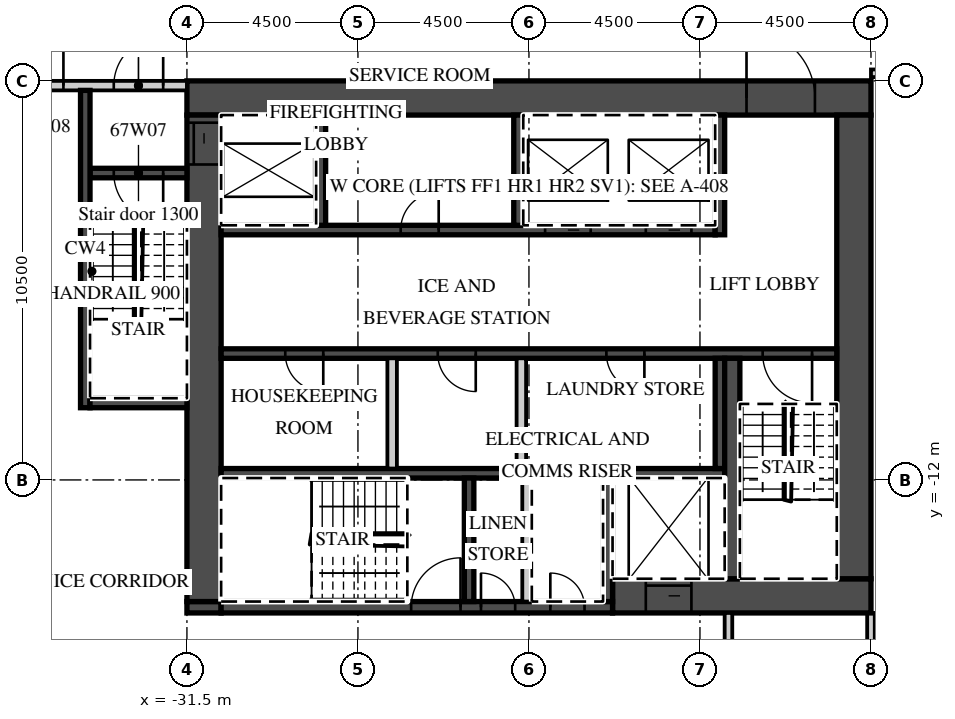
"""IFC4 building model, lengths in metres.
Left out: names, types, materials, properties, quantities, classifications, styles, units other than length and angle.
Written with IfcOpenShell. Run it as: python <this file> out.ifc"""

import sys

from ifc_helpers import new_model, si_unit, direction, frame, frame_2d, origin, place, context, subcontext, project, spatial, rectangle, extrude, element, fill, save


model = new_model("IFC4")
c1 = context("Model", 3, precision=1e-05, world=origin(), true_north=direction((0.0, 1.0)))
c2 = subcontext(c1, "Body", "Model", "MODEL_VIEW")
j1 = project(units=[si_unit("LENGTHUNIT", "METRE"), si_unit("PLANEANGLEUNIT", "RADIAN")], contexts=[c1])
p1 = place(None, origin())
s1 = spatial("IfcSite", under=j1, at=p1, CompositionType="ELEMENT")
p2 = place(p1, origin())
s2 = spatial("IfcBuilding", under=s1, at=p2, CompositionType="ELEMENT")
p3 = place(p2, frame((0.0, 0.0, 271.8)))
s3 = spatial("IfcBuildingStorey", under=s2, at=p3, CompositionType="ELEMENT", Elevation=271.8)
p4 = place(p3, frame((-13.5, -21.396, 0.0), z_axis=(0.0, 0.0, 1.0), x_axis=(0.0, 1.0, 0.0)))
e1 = element("IfcWall", 1, at=p4, inside=s3, PredefinedType="PARTITIONING", context=c2, shape_type="SweptSolid", body=[
    extrude(rectangle(XDim=5.896, YDim=0.2, at=frame_2d((2.948, 0.0))), origin(), (0.0, 0.0, 1.0), 3.02),
])
p5 = place(p3, frame((-13.5, -1.3, 0.0), z_axis=(0.0, 0.0, 1.0), x_axis=(1.0, 0.0, 0.0)))
e2 = element("IfcWall", 2, at=p5, inside=s3, PredefinedType="PARTITIONING", context=c2, shape_type="SweptSolid", body=[
    extrude(rectangle(XDim=50.293, YDim=0.2, at=frame_2d((25.146, 0.0))), origin(), (0.0, 0.0, 1.0), 3.02),
])
p6 = place(p5, frame((0.575, 0.0, 0.0)))
e3 = element("IfcOpeningElement", 3, at=p6, cuts=e2, PredefinedType="OPENING", context=c2, shape_type="SweptSolid", body=[
    extrude(rectangle(XDim=1.0, YDim=2.1, at=frame_2d((0.5, 1.05))), frame((0.0, 0.11, 0.0), z_axis=(0.0, -1.0, 0.0), x_axis=(1.0, 0.0, 0.0)), (0.0, 0.0, 1.0), 0.22),
])
p7 = place(p5, frame((6.938, 0.0, 0.0)))
e4 = element("IfcOpeningElement", 4, at=p7, cuts=e2, PredefinedType="OPENING", context=c2, shape_type="SweptSolid", body=[
    extrude(rectangle(XDim=1.2, YDim=2.1, at=frame_2d((0.6, 1.05))), frame((0.0, 0.11, 0.0), z_axis=(0.0, -1.0, 0.0), x_axis=(1.0, 0.0, 0.0)), (0.0, 0.0, 1.0), 0.22),
])
p8 = place(p5, frame((18.862, 0.0, 0.0)))
e5 = element("IfcOpeningElement", 5, at=p8, cuts=e2, PredefinedType="OPENING", context=c2, shape_type="SweptSolid", body=[
    extrude(rectangle(XDim=1.2, YDim=2.1, at=frame_2d((0.6, 1.05))), frame((0.0, 0.11, 0.0), z_axis=(0.0, -1.0, 0.0), x_axis=(1.0, 0.0, 0.0)), (0.0, 0.0, 1.0), 0.22),
])
p9 = place(p5, frame((24.938, 0.0, 0.0)))
e6 = element("IfcOpeningElement", 6, at=p9, cuts=e2, PredefinedType="OPENING", context=c2, shape_type="SweptSolid", body=[
    extrude(rectangle(XDim=1.2, YDim=2.1, at=frame_2d((0.6, 1.05))), frame((0.0, 0.11, 0.0), z_axis=(0.0, -1.0, 0.0), x_axis=(1.0, 0.0, 0.0)), (0.0, 0.0, 1.0), 0.22),
])
p10 = place(p5, frame((36.862, 0.0, 0.0)))
e7 = element("IfcOpeningElement", 7, at=p10, cuts=e2, PredefinedType="OPENING", context=c2, shape_type="SweptSolid", body=[
    extrude(rectangle(XDim=1.2, YDim=2.1, at=frame_2d((0.6, 1.05))), frame((0.0, 0.11, 0.0), z_axis=(0.0, -1.0, 0.0), x_axis=(1.0, 0.0, 0.0)), (0.0, 0.0, 1.0), 0.22),
])
p11 = place(p5, frame((43.45, 0.0, 0.0)))
e8 = element("IfcOpeningElement", 8, at=p11, cuts=e2, PredefinedType="OPENING", context=c2, shape_type="SweptSolid", body=[
    extrude(rectangle(XDim=1.0, YDim=2.1, at=frame_2d((0.5, 1.05))), frame((0.0, 0.11, 0.0), z_axis=(0.0, -1.0, 0.0), x_axis=(1.0, 0.0, 0.0)), (0.0, 0.0, 1.0), 0.22),
])
p12 = place(p5, frame((45.55, 0.0, 0.0)))
e9 = element("IfcOpeningElement", 9, at=p12, cuts=e2, PredefinedType="OPENING", context=c2, shape_type="SweptSolid", body=[
    extrude(rectangle(XDim=1.0, YDim=2.1, at=frame_2d((0.5, 1.05))), frame((0.0, 0.11, 0.0), z_axis=(0.0, -1.0, 0.0), x_axis=(1.0, 0.0, 0.0)), (0.0, 0.0, 1.0), 0.22),
])
p13 = place(p3, frame((-31.5, -1.95, 0.0), z_axis=(0.0, 0.0, 1.0), x_axis=(1.0, 0.0, 0.0)))
e10 = element("IfcWall", 10, at=p13, inside=s3, PredefinedType="SHEAR", context=c2, shape_type="SweptSolid", body=[
    extrude(rectangle(XDim=18.0, YDim=0.9, at=frame_2d((9.0, 0.0))), origin(), (0.0, 0.0, 1.0), 3.02),
])
p14 = place(p13, frame((14.725, 0.0, 0.0)))
e11 = element("IfcOpeningElement", 11, at=p14, cuts=e10, PredefinedType="OPENING", context=c2, shape_type="SweptSolid", body=[
    extrude(rectangle(XDim=1.8, YDim=2.1, at=frame_2d((0.9, 1.05))), frame((0.0, 0.46, 0.0), z_axis=(0.0, -1.0, 0.0), x_axis=(1.0, 0.0, 0.0)), (0.0, 0.0, 1.0), 0.92),
])
p15 = place(p3, frame((-20.3, -15.05, 0.0), z_axis=(0.0, 0.0, 1.0), x_axis=(1.0, 0.0, 0.0)))
e12 = element("IfcWall", 12, at=p15, inside=s3, PredefinedType="SHEAR", context=c2, shape_type="SweptSolid", body=[
    extrude(rectangle(XDim=6.8, YDim=0.9, at=frame_2d((3.4, 0.0))), origin(), (0.0, 0.0, 1.0), 3.02),
])
p16 = place(p15, frame((0.875, 0.0, 0.0)))
e13 = element("IfcOpeningElement", 13, at=p16, cuts=e12, PredefinedType="OPENING", context=c2, shape_type="SweptSolid", body=[
    extrude(rectangle(XDim=1.2, YDim=2.1, at=frame_2d((0.6, 1.05))), frame((0.0, 0.46, 0.0), z_axis=(0.0, -1.0, 0.0), x_axis=(1.0, 0.0, 0.0)), (0.0, 0.0, 1.0), 0.92),
])
p17 = place(p3, frame((-31.5, -15.35, 0.0), z_axis=(0.0, 0.0, 1.0), x_axis=(1.0, 0.0, 0.0)))
e14 = element("IfcWall", 14, at=p17, inside=s3, PredefinedType="SHEAR", context=c2, shape_type="SweptSolid", body=[
    extrude(rectangle(XDim=0.9, YDim=0.3, at=frame_2d((0.45, 0.0))), origin(), (0.0, 0.0, 1.0), 3.02),
])
p18 = place(p3, frame((-30.6, -15.35, 0.0), z_axis=(0.0, 0.0, 1.0), x_axis=(1.0, 0.0, 0.0)))
e15 = element("IfcWall", 15, at=p18, inside=s3, PredefinedType="SHEAR", context=c2, shape_type="SweptSolid", body=[
    extrude(rectangle(XDim=10.3, YDim=0.3, at=frame_2d((5.15, 0.0))), origin(), (0.0, 0.0, 1.0), 3.02),
])
p19 = place(p18, frame((5.0, 0.0, 0.0)))
e16 = element("IfcOpeningElement", 16, at=p19, cuts=e15, PredefinedType="OPENING", context=c2, shape_type="SweptSolid", body=[
    extrude(rectangle(XDim=1.3, YDim=2.1, at=frame_2d((0.65, 1.05))), frame((0.0, 0.16, 0.0), z_axis=(0.0, -1.0, 0.0), x_axis=(1.0, 0.0, 0.0)), (0.0, 0.0, 1.0), 0.32),
])
p20 = place(p18, frame((6.837, 0.0, 0.0)))
e17 = element("IfcOpeningElement", 17, at=p20, cuts=e15, PredefinedType="OPENING", context=c2, shape_type="SweptSolid", body=[
    extrude(rectangle(XDim=0.9, YDim=2.1, at=frame_2d((0.45, 1.05))), frame((0.0, 0.16, 0.0), z_axis=(0.0, -1.0, 0.0), x_axis=(1.0, 0.0, 0.0)), (0.0, 0.0, 1.0), 0.32),
])
p21 = place(p18, frame((8.663, 0.0, 0.0)))
e18 = element("IfcOpeningElement", 18, at=p21, cuts=e15, PredefinedType="OPENING", context=c2, shape_type="SweptSolid", body=[
    extrude(rectangle(XDim=0.9, YDim=2.1, at=frame_2d((0.45, 1.05))), frame((0.0, 0.16, 0.0), z_axis=(0.0, -1.0, 0.0), x_axis=(1.0, 0.0, 0.0)), (0.0, 0.0, 1.0), 0.32),
])
p22 = place(p3, frame((-31.05, -15.2, 0.0), z_axis=(0.0, 0.0, 1.0), x_axis=(0.0, 1.0, 0.0)))
e19 = element("IfcWall", 19, at=p22, inside=s3, PredefinedType="SHEAR", context=c2, shape_type="SweptSolid", body=[
    extrude(rectangle(XDim=12.8, YDim=0.9, at=frame_2d((6.4, 0.0))), origin(), (0.0, 0.0, 1.0), 3.02),
])
p23 = place(p22, frame((11.5, 0.0, 0.0)))
e20 = element("IfcOpeningElement", 20, at=p23, cuts=e19, PredefinedType="OPENING", context=c2, shape_type="SweptSolid", body=[
    extrude(rectangle(XDim=1.1, YDim=2.1, at=frame_2d((0.55, 1.05))), frame((0.0, 0.46, 0.0), z_axis=(0.0, -1.0, 0.0), x_axis=(1.0, 0.0, 0.0)), (0.0, 0.0, 1.0), 0.92),
])
p24 = place(p3, frame((-13.95, -14.6, 0.0), z_axis=(0.0, 0.0, 1.0), x_axis=(0.0, 1.0, 0.0)))
e21 = element("IfcWall", 21, at=p24, inside=s3, PredefinedType="SHEAR", context=c2, shape_type="SweptSolid", body=[
    extrude(rectangle(XDim=12.2, YDim=0.9, at=frame_2d((6.1, 0.0))), origin(), (0.0, 0.0, 1.0), 3.02),
])
p25 = place(p3, frame((-30.6, -5.425, 0.0), z_axis=(0.0, 0.0, 1.0), x_axis=(1.0, 0.0, 0.0)))
e22 = element("IfcWall", 22, at=p25, inside=s3, PredefinedType="SHEAR", context=c2, shape_type="SweptSolid", body=[
    extrude(rectangle(XDim=13.0, YDim=0.25, at=frame_2d((6.5, 0.0))), origin(), (0.0, 0.0, 1.0), 3.02),
])
p26 = place(p25, frame((8.525, 0.0, 0.0)))
e23 = element("IfcOpeningElement", 23, at=p26, cuts=e22, PredefinedType="OPENING", context=c2, shape_type="SweptSolid", body=[
    extrude(rectangle(XDim=1.2, YDim=2.1, at=frame_2d((0.6, 1.05))), frame((0.0, 0.135, 0.0), z_axis=(0.0, -1.0, 0.0), x_axis=(1.0, 0.0, 0.0)), (0.0, 0.0, 1.0), 0.27),
])
p27 = place(p25, frame((11.175, 0.0, 0.0)))
e24 = element("IfcOpeningElement", 24, at=p27, cuts=e22, PredefinedType="OPENING", context=c2, shape_type="SweptSolid", body=[
    extrude(rectangle(XDim=1.2, YDim=2.1, at=frame_2d((0.6, 1.05))), frame((0.0, 0.135, 0.0), z_axis=(0.0, -1.0, 0.0), x_axis=(1.0, 0.0, 0.0)), (0.0, 0.0, 1.0), 0.27),
])
p28 = place(p25, frame((4.725, 0.0, 0.0)))
e25 = element("IfcOpeningElement", 25, at=p28, cuts=e22, PredefinedType="OPENING", context=c2, shape_type="SweptSolid", body=[
    extrude(rectangle(XDim=1.0, YDim=2.1, at=frame_2d((0.5, 1.05))), frame((0.0, 0.135, 0.0), z_axis=(0.0, -1.0, 0.0), x_axis=(1.0, 0.0, 0.0)), (0.0, 0.0, 1.0), 0.27),
])
p29 = place(p3, frame((-17.475, -5.55, 0.0), z_axis=(0.0, 0.0, 1.0), x_axis=(0.0, 1.0, 0.0)))
e26 = element("IfcWall", 26, at=p29, inside=s3, PredefinedType="SHEAR", context=c2, shape_type="SweptSolid", body=[
    extrude(rectangle(XDim=3.15, YDim=0.25, at=frame_2d((1.575, 0.0))), origin(), (0.0, 0.0, 1.0), 3.02),
])
for number, where, z_axis, x_axis in (
    (27, (-27.975, -5.3, 0.0), (0.0, 0.0, 1.0), (0.0, 1.0, 0.0)),
    (28, (-22.775, -5.3, 0.0), (0.0, 0.0, 1.0), (0.0, 1.0, 0.0)),
):
    element("IfcWall", number, at=place(p3, frame(where, z_axis=z_axis, x_axis=x_axis)), inside=s3, PredefinedType="SHEAR", context=c2, shape_type="SweptSolid", body=[
        extrude(rectangle(XDim=2.9, YDim=0.25, at=frame_2d((1.45, 0.0))), origin(), (0.0, 0.0, 1.0), 3.02),
    ])
p30 = place(p3, frame((-30.6, -8.675, 0.0), z_axis=(0.0, 0.0, 1.0), x_axis=(1.0, 0.0, 0.0)))
e29 = element("IfcWall", 29, at=p30, inside=s3, PredefinedType="SHEAR", context=c2, shape_type="SweptSolid", body=[
    extrude(rectangle(XDim=16.2, YDim=0.25, at=frame_2d((8.1, 0.0))), origin(), (0.0, 0.0, 1.0), 3.02),
])
p31 = place(p30, frame((14.25, 0.0, 0.0)))
e30 = element("IfcOpeningElement", 30, at=p31, cuts=e29, PredefinedType="OPENING", context=c2, shape_type="SweptSolid", body=[
    extrude(rectangle(XDim=1.3, YDim=2.1, at=frame_2d((0.65, 1.05))), frame((0.0, 0.135, 0.0), z_axis=(0.0, -1.0, 0.0), x_axis=(1.0, 0.0, 0.0)), (0.0, 0.0, 1.0), 0.27),
])
p32 = place(p30, frame((1.688, 0.0, 0.0)))
e31 = element("IfcOpeningElement", 31, at=p32, cuts=e29, PredefinedType="OPENING", context=c2, shape_type="SweptSolid", body=[
    extrude(rectangle(XDim=1.0, YDim=2.1, at=frame_2d((0.5, 1.05))), frame((0.0, 0.135, 0.0), z_axis=(0.0, -1.0, 0.0), x_axis=(1.0, 0.0, 0.0)), (0.0, 0.0, 1.0), 0.27),
])
p33 = place(p30, frame((5.7, 0.0, 0.0)))
e32 = element("IfcOpeningElement", 32, at=p33, cuts=e29, PredefinedType="OPENING", context=c2, shape_type="SweptSolid", body=[
    extrude(rectangle(XDim=1.0, YDim=2.1, at=frame_2d((0.5, 1.05))), frame((0.0, 0.135, 0.0), z_axis=(0.0, -1.0, 0.0), x_axis=(1.0, 0.0, 0.0)), (0.0, 0.0, 1.0), 0.27),
])
p34 = place(p30, frame((10.137, 0.0, 0.0)))
e33 = element("IfcOpeningElement", 33, at=p34, cuts=e29, PredefinedType="OPENING", context=c2, shape_type="SweptSolid", body=[
    extrude(rectangle(XDim=1.0, YDim=2.1, at=frame_2d((0.5, 1.05))), frame((0.0, 0.135, 0.0), z_axis=(0.0, -1.0, 0.0), x_axis=(1.0, 0.0, 0.0)), (0.0, 0.0, 1.0), 0.27),
])
p35 = place(p3, frame((-30.6, -11.825, 0.0), z_axis=(0.0, 0.0, 1.0), x_axis=(1.0, 0.0, 0.0)))
e34 = element("IfcWall", 34, at=p35, inside=s3, PredefinedType="SHEAR", context=c2, shape_type="SweptSolid", body=[
    extrude(rectangle(XDim=13.25, YDim=0.25, at=frame_2d((6.625, 0.0))), origin(), (0.0, 0.0, 1.0), 3.02),
])
p36 = place(p3, frame((-17.475, -11.7, 0.0), z_axis=(0.0, 0.0, 1.0), x_axis=(0.0, 1.0, 0.0)))
e35 = element("IfcWall", 35, at=p36, inside=s3, PredefinedType="SHEAR", context=c2, shape_type="SweptSolid", body=[
    extrude(rectangle(XDim=2.9, YDim=0.25, at=frame_2d((1.45, 0.0))), origin(), (0.0, 0.0, 1.0), 3.02),
])
for number, where, z_axis, x_axis in (
    (36, (-26.1, -11.7, 0.0), (0.0, 0.0, 1.0), (0.0, 1.0, 0.0)),
    (37, (-22.7, -11.7, 0.0), (0.0, 0.0, 1.0), (0.0, 1.0, 0.0)),
):
    element("IfcWall", number, at=place(p3, frame(where, z_axis=z_axis, x_axis=x_axis)), inside=s3, PredefinedType="PARTITIONING", context=c2, shape_type="SweptSolid", body=[
        extrude(rectangle(XDim=2.9, YDim=0.25, at=frame_2d((1.45, 0.0))), origin(), (0.0, 0.0, 1.0), 3.02),
    ])
p37 = place(p3, frame((-17.15, -14.6, 0.0), z_axis=(0.0, 0.0, 1.0), x_axis=(0.0, 1.0, 0.0)))
e38 = element("IfcWall", 38, at=p37, inside=s3, PredefinedType="SHEAR", context=c2, shape_type="SweptSolid", body=[
    extrude(rectangle(XDim=5.8, YDim=0.4, at=frame_2d((2.9, 0.0))), origin(), (0.0, 0.0, 1.0), 3.02),
])
for number, where, z_axis, x_axis in (
    (39, (-20.425, -15.2, 0.0), (0.0, 0.0, 1.0), (0.0, 1.0, 0.0)),
    (40, (-24.075, -15.2, 0.0), (0.0, 0.0, 1.0), (0.0, 1.0, 0.0)),
):
    element("IfcWall", number, at=place(p3, frame(where, z_axis=z_axis, x_axis=x_axis)), inside=s3, PredefinedType="SHEAR", context=c2, shape_type="SweptSolid", body=[
        extrude(rectangle(XDim=3.25, YDim=0.25, at=frame_2d((1.625, 0.0))), origin(), (0.0, 0.0, 1.0), 3.02),
    ])
p38 = place(p3, frame((-22.55, -15.2, 0.0), z_axis=(0.0, 0.0, 1.0), x_axis=(0.0, 1.0, 0.0)))
e41 = element("IfcWall", 41, at=p38, inside=s3, PredefinedType="PARTITIONING", context=c2, shape_type="SweptSolid", body=[
    extrude(rectangle(XDim=3.25, YDim=0.25, at=frame_2d((1.625, 0.0))), origin(), (0.0, 0.0, 1.0), 3.02),
])
p39 = place(p3, frame((-39.627, -1.625, 0.0), z_axis=(0.0, 0.0, 1.0), x_axis=(1.0, 0.0, 0.0)))
e42 = element("IfcWall", 42, at=p39, inside=s3, PredefinedType="PARTITIONING", context=c2, shape_type="SweptSolid", body=[
    extrude(rectangle(XDim=8.127, YDim=0.25, at=frame_2d((4.063, 0.0))), origin(), (0.0, 0.0, 1.0), 3.02),
])
p40 = place(p39, frame((6.202, 0.0, 0.0)))
e43 = element("IfcOpeningElement", 43, at=p40, cuts=e42, PredefinedType="OPENING", context=c2, shape_type="SweptSolid", body=[
    extrude(rectangle(XDim=1.3, YDim=2.1, at=frame_2d((0.65, 1.05))), frame((0.0, 0.135, 0.0), z_axis=(0.0, -1.0, 0.0), x_axis=(1.0, 0.0, 0.0)), (0.0, 0.0, 1.0), 0.27),
])
p41 = place(p39, frame((3.777, 0.0, 0.0)))
e44 = element("IfcOpeningElement", 44, at=p41, cuts=e42, PredefinedType="OPENING", context=c2, shape_type="SweptSolid", body=[
    extrude(rectangle(XDim=1.1, YDim=2.1, at=frame_2d((0.55, 1.05))), frame((0.0, 0.135, 0.0), z_axis=(0.0, -1.0, 0.0), x_axis=(1.0, 0.0, 0.0)), (0.0, 0.0, 1.0), 0.27),
])
p42 = place(p3, frame((-34.05, -3.925, 0.0), z_axis=(0.0, 0.0, 1.0), x_axis=(1.0, 0.0, 0.0)))
e45 = element("IfcWall", 45, at=p42, inside=s3, PredefinedType="SHEAR", context=c2, shape_type="SweptSolid", body=[
    extrude(rectangle(XDim=2.55, YDim=0.25, at=frame_2d((1.275, 0.0))), origin(), (0.0, 0.0, 1.0), 3.02),
])
p43 = place(p42, frame((0.625, 0.0, 0.0)))
e46 = element("IfcOpeningElement", 46, at=p43, cuts=e45, PredefinedType="OPENING", context=c2, shape_type="SweptSolid", body=[
    extrude(rectangle(XDim=1.3, YDim=2.1, at=frame_2d((0.65, 1.05))), frame((0.0, 0.135, 0.0), z_axis=(0.0, -1.0, 0.0), x_axis=(1.0, 0.0, 0.0)), (0.0, 0.0, 1.0), 0.27),
])
p44 = place(p3, frame((-34.175, -10.1, 0.0), z_axis=(0.0, 0.0, 1.0), x_axis=(0.0, 1.0, 0.0)))
e47 = element("IfcWall", 47, at=p44, inside=s3, PredefinedType="SHEAR", context=c2, shape_type="SweptSolid", body=[
    extrude(rectangle(XDim=8.35, YDim=0.25, at=frame_2d((4.175, 0.0))), origin(), (0.0, 0.0, 1.0), 3.02),
])
p45 = place(p3, frame((-34.05, -9.975, 0.0), z_axis=(0.0, 0.0, 1.0), x_axis=(1.0, 0.0, 0.0)))
e48 = element("IfcWall", 48, at=p45, inside=s3, PredefinedType="SHEAR", context=c2, shape_type="SweptSolid", body=[
    extrude(rectangle(XDim=2.55, YDim=0.25, at=frame_2d((1.275, 0.0))), origin(), (0.0, 0.0, 1.0), 3.02),
])
p46 = place(p3, frame((-17.25, -17.7, 0.0), z_axis=(0.0, 0.0, 1.0), x_axis=(0.0, 1.0, 0.0)))
e49 = element("IfcWall", 49, at=p46, inside=s3, PredefinedType="PARTITIONING", context=c2, shape_type="SweptSolid", body=[
    extrude(rectangle(XDim=2.2, YDim=0.2, at=frame_2d((1.1, 0.0))), origin(), (0.0, 0.0, 1.0), 3.02),
])
p47 = place(p26, origin())
e50 = element("IfcDoor", 50, at=p47, inside=s3, OperationType="SLIDING_TO_LEFT", PredefinedType="DOOR", context=c2, shape_type="SweptSolid", body=[
    extrude(rectangle(XDim=1.2, YDim=2.1, at=frame_2d((0.6, 1.05))), frame((0.0, 0.025, 0.0), z_axis=(0.0, -1.0, 0.0), x_axis=(1.0, 0.0, 0.0)), (0.0, 0.0, 1.0), 0.05),
])
fill(e23, e50)
p48 = place(p27, origin())
e51 = element("IfcDoor", 51, at=p48, inside=s3, OperationType="SLIDING_TO_RIGHT", PredefinedType="DOOR", context=c2, shape_type="SweptSolid", body=[
    extrude(rectangle(XDim=1.2, YDim=2.1, at=frame_2d((0.6, 1.05))), frame((0.0, 0.025, 0.0), z_axis=(0.0, -1.0, 0.0), x_axis=(1.0, 0.0, 0.0)), (0.0, 0.0, 1.0), 0.05),
])
fill(e24, e51)
p49 = place(p16, origin())
e52 = element("IfcDoor", 52, at=p49, inside=s3, OperationType="SLIDING_TO_LEFT", PredefinedType="DOOR", context=c2, shape_type="SweptSolid", body=[
    extrude(rectangle(XDim=1.2, YDim=2.1, at=frame_2d((0.6, 1.05))), frame((0.0, 0.025, 0.0), z_axis=(0.0, -1.0, 0.0), x_axis=(1.0, 0.0, 0.0)), (0.0, 0.0, 1.0), 0.05),
])
fill(e13, e52)
p50 = place(p23, origin())
e53 = element("IfcDoor", 53, at=p50, inside=s3, OperationType="SLIDING_TO_RIGHT", PredefinedType="DOOR", context=c2, shape_type="SweptSolid", body=[
    extrude(rectangle(XDim=1.1, YDim=2.1, at=frame_2d((0.55, 1.05))), frame((0.0, 0.025, 0.0), z_axis=(0.0, -1.0, 0.0), x_axis=(1.0, 0.0, 0.0)), (0.0, 0.0, 1.0), 0.05),
])
fill(e20, e53)
p51 = place(p14, origin())
e54 = element("IfcDoor", 54, at=p51, inside=s3, OperationType="DOUBLE_DOOR_DOUBLE_SWING", PredefinedType="DOOR", context=c2, shape_type="SweptSolid", body=[
    extrude(rectangle(XDim=1.8, YDim=2.1, at=frame_2d((0.9, 1.05))), frame((0.0, 0.025, 0.0), z_axis=(0.0, -1.0, 0.0), x_axis=(1.0, 0.0, 0.0)), (0.0, 0.0, 1.0), 0.05),
])
fill(e11, e54)
p52 = place(p40, origin())
e55 = element("IfcDoor", 55, at=p52, inside=s3, OperationType="SINGLE_SWING_RIGHT", PredefinedType="DOOR", context=c2, shape_type="SweptSolid", body=[
    extrude(rectangle(XDim=1.3, YDim=2.1, at=frame_2d((0.65, 1.05))), frame((0.0, 0.025, 0.0), z_axis=(0.0, -1.0, 0.0), x_axis=(1.0, 0.0, 0.0)), (0.0, 0.0, 1.0), 0.05),
])
fill(e43, e55)
p53 = place(p43, origin())
e56 = element("IfcDoor", 56, at=p53, inside=s3, OperationType="SINGLE_SWING_RIGHT", PredefinedType="DOOR", context=c2, shape_type="SweptSolid", body=[
    extrude(rectangle(XDim=1.3, YDim=2.1, at=frame_2d((0.65, 1.05))), frame((0.0, 0.025, 0.0), z_axis=(0.0, -1.0, 0.0), x_axis=(1.0, 0.0, 0.0)), (0.0, 0.0, 1.0), 0.05),
])
fill(e46, e56)
p54 = place(p41, origin())
e57 = element("IfcDoor", 57, at=p54, inside=s3, OperationType="SINGLE_SWING_RIGHT", PredefinedType="DOOR", context=c2, shape_type="SweptSolid", body=[
    extrude(rectangle(XDim=1.1, YDim=2.1, at=frame_2d((0.55, 1.05))), frame((0.0, 0.025, 0.0), z_axis=(0.0, -1.0, 0.0), x_axis=(1.0, 0.0, 0.0)), (0.0, 0.0, 1.0), 0.05),
])
fill(e44, e57)
p55 = place(p31, origin())
e58 = element("IfcDoor", 58, at=p55, inside=s3, OperationType="SINGLE_SWING_RIGHT", PredefinedType="DOOR", context=c2, shape_type="SweptSolid", body=[
    extrude(rectangle(XDim=1.3, YDim=2.1, at=frame_2d((0.65, 1.05))), frame((0.0, 0.025, 0.0), z_axis=(0.0, -1.0, 0.0), x_axis=(1.0, 0.0, 0.0)), (0.0, 0.0, 1.0), 0.05),
])
fill(e30, e58)
p56 = place(p19, origin())
e59 = element("IfcDoor", 59, at=p56, inside=s3, OperationType="SINGLE_SWING_RIGHT", PredefinedType="DOOR", context=c2, shape_type="SweptSolid", body=[
    extrude(rectangle(XDim=1.3, YDim=2.1, at=frame_2d((0.65, 1.05))), frame((0.0, 0.025, 0.0), z_axis=(0.0, -1.0, 0.0), x_axis=(1.0, 0.0, 0.0)), (0.0, 0.0, 1.0), 0.05),
])
fill(e16, e59)
p57 = place(p20, origin())
e60 = element("IfcDoor", 60, at=p57, inside=s3, OperationType="SINGLE_SWING_LEFT", PredefinedType="DOOR", context=c2, shape_type="SweptSolid", body=[
    extrude(rectangle(XDim=0.9, YDim=2.1, at=frame_2d((0.45, 1.05))), frame((0.0, 0.025, 0.0), z_axis=(0.0, -1.0, 0.0), x_axis=(1.0, 0.0, 0.0)), (0.0, 0.0, 1.0), 0.05),
])
fill(e17, e60)
p58 = place(p21, origin())
e61 = element("IfcDoor", 61, at=p58, inside=s3, OperationType="SINGLE_SWING_LEFT", PredefinedType="DOOR", context=c2, shape_type="SweptSolid", body=[
    extrude(rectangle(XDim=0.9, YDim=2.1, at=frame_2d((0.45, 1.05))), frame((0.0, 0.025, 0.0), z_axis=(0.0, -1.0, 0.0), x_axis=(1.0, 0.0, 0.0)), (0.0, 0.0, 1.0), 0.05),
])
fill(e18, e61)
p59 = place(p32, origin())
e62 = element("IfcDoor", 62, at=p59, inside=s3, OperationType="SINGLE_SWING_RIGHT", PredefinedType="DOOR", context=c2, shape_type="SweptSolid", body=[
    extrude(rectangle(XDim=1.0, YDim=2.1, at=frame_2d((0.5, 1.05))), frame((0.0, 0.025, 0.0), z_axis=(0.0, -1.0, 0.0), x_axis=(1.0, 0.0, 0.0)), (0.0, 0.0, 1.0), 0.05),
])
fill(e31, e62)
p60 = place(p33, origin())
e63 = element("IfcDoor", 63, at=p60, inside=s3, OperationType="SINGLE_SWING_RIGHT", PredefinedType="DOOR", context=c2, shape_type="SweptSolid", body=[
    extrude(rectangle(XDim=1.0, YDim=2.1, at=frame_2d((0.5, 1.05))), frame((0.0, 0.025, 0.0), z_axis=(0.0, -1.0, 0.0), x_axis=(1.0, 0.0, 0.0)), (0.0, 0.0, 1.0), 0.05),
])
fill(e32, e63)
p61 = place(p34, origin())
e64 = element("IfcDoor", 64, at=p61, inside=s3, OperationType="SINGLE_SWING_RIGHT", PredefinedType="DOOR", context=c2, shape_type="SweptSolid", body=[
    extrude(rectangle(XDim=1.0, YDim=2.1, at=frame_2d((0.5, 1.05))), frame((0.0, 0.025, 0.0), z_axis=(0.0, -1.0, 0.0), x_axis=(1.0, 0.0, 0.0)), (0.0, 0.0, 1.0), 0.05),
])
fill(e33, e64)
p62 = place(p28, origin())
e65 = element("IfcDoor", 65, at=p62, inside=s3, OperationType="SINGLE_SWING_RIGHT", PredefinedType="DOOR", context=c2, shape_type="SweptSolid", body=[
    extrude(rectangle(XDim=1.0, YDim=2.1, at=frame_2d((0.5, 1.05))), frame((0.0, 0.025, 0.0), z_axis=(0.0, -1.0, 0.0), x_axis=(1.0, 0.0, 0.0)), (0.0, 0.0, 1.0), 0.05),
])
fill(e25, e65)
save(model, sys.argv[1])
